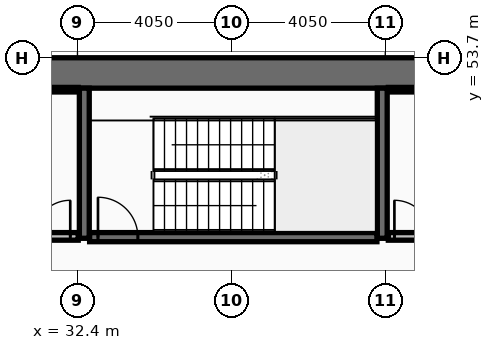
"""IFC4 building model, lengths in metres.
Left out: names, types, materials, properties, quantities, classifications, styles, units other than length and angle.
Written with IfcOpenShell. Run it as: python <this file> out.ifc"""

import sys

from ifc_helpers import new_model, si_unit, direction, frame, frame_2d, origin, place, context, subcontext, project, spatial, rectangle, extrude, element, fill, save


model = new_model("IFC4")
c1 = context("Model", 3, precision=1e-05, world=origin(), true_north=direction((0.0, 1.0)))
c2 = subcontext(c1, "Body", "Model", "MODEL_VIEW")
j1 = project(units=[si_unit("LENGTHUNIT", "METRE"), si_unit("PLANEANGLEUNIT", "RADIAN")], contexts=[c1])
p1 = place(None, origin())
s1 = spatial("IfcSite", under=j1, at=p1, CompositionType="ELEMENT")
p2 = place(p1, origin())
s2 = spatial("IfcBuilding", under=s1, at=p2, CompositionType="ELEMENT")
p3 = place(p2, frame((0.0, 0.0, 73.8)))
s3 = spatial("IfcBuildingStorey", under=s2, at=p3, CompositionType="ELEMENT", Elevation=73.8)
p4 = place(p3, frame((16.2, 53.3, 0.0), z_axis=(0.0, 0.0, 1.0), x_axis=(1.0, 0.0, 0.0)))
e1 = element("IfcWall", 1, at=p4, inside=s3, PredefinedType="SHEAR", context=c2, shape_type="SweptSolid", body=[
    extrude(rectangle(XDim=40.5, YDim=0.8, at=frame_2d((20.25, 0.0))), origin(), (0.0, 0.0, 1.0), 3.82),
])
for number, where, z_axis, x_axis in (
    (2, (32.58, 48.95, 0.0), (0.0, 0.0, 1.0), (0.0, 1.0, 0.0)),
    (3, (40.42, 48.95, 0.0), (0.0, 0.0, 1.0), (0.0, 1.0, 0.0)),
):
    element("IfcWall", number, at=place(p3, frame(where, z_axis=z_axis, x_axis=x_axis)), inside=s3, PredefinedType="SHEAR", context=c2, shape_type="SweptSolid", body=[
        extrude(rectangle(XDim=3.95, YDim=0.26, at=frame_2d((1.975, 0.0))), origin(), (0.0, 0.0, 1.0), 3.82),
    ])
p5 = place(p3, frame((32.72, 48.98, 0.0), z_axis=(0.0, 0.0, 1.0), x_axis=(1.0, 0.0, 0.0)))
e4 = element("IfcWall", 4, at=p5, inside=s3, PredefinedType="SHEAR", context=c2, shape_type="SweptSolid", body=[
    extrude(rectangle(XDim=7.56, YDim=0.24, at=frame_2d((3.78, 0.0))), origin(), (0.0, 0.0, 1.0), 3.82),
])
p6 = place(p5, frame((0.22, 0.0, 0.0)))
e5 = element("IfcOpeningElement", 5, at=p6, cuts=e4, PredefinedType="OPENING", context=c2, shape_type="SweptSolid", body=[
    extrude(rectangle(XDim=1.05, YDim=2.15, at=frame_2d((0.525, 1.075))), frame((0.0, 0.13, 0.0), z_axis=(0.0, -1.0, 0.0), x_axis=(1.0, 0.0, 0.0)), (0.0, 0.0, 1.0), 0.26),
])
p7 = place(p3, frame((24.7, 52.86, 0.0), z_axis=(0.0, 0.0, 1.0), x_axis=(1.0, 0.0, 0.0)))
e6 = element("IfcWall", 6, at=p7, inside=s3, PredefinedType="PARTITIONING", context=c2, shape_type="SweptSolid", body=[
    extrude(rectangle(XDim=7.72, YDim=0.12, at=frame_2d((3.86, 0.0))), origin(), (0.0, 0.0, 1.0), 3.82),
])
p8 = place(p3, frame((24.7, 49.0, 0.0), z_axis=(0.0, 0.0, 1.0), x_axis=(1.0, 0.0, 0.0)))
e7 = element("IfcWall", 7, at=p8, inside=s3, PredefinedType="PARTITIONING", context=c2, shape_type="SweptSolid", body=[
    extrude(rectangle(XDim=7.72, YDim=0.2, at=frame_2d((3.86, 0.0))), origin(), (0.0, 0.0, 1.0), 3.82),
])
p9 = place(p8, frame((6.56, 0.0, 0.0)))
e8 = element("IfcOpeningElement", 8, at=p9, cuts=e7, PredefinedType="OPENING", context=c2, shape_type="SweptSolid", body=[
    extrude(rectangle(XDim=0.95, YDim=2.1, at=frame_2d((0.475, 1.05))), frame((0.0, 0.11, 0.0), z_axis=(0.0, -1.0, 0.0), x_axis=(1.0, 0.0, 0.0)), (0.0, 0.0, 1.0), 0.22),
])
p10 = place(p3, frame((40.58, 52.86, 0.0), z_axis=(0.0, 0.0, 1.0), x_axis=(1.0, 0.0, 0.0)))
e9 = element("IfcWall", 9, at=p10, inside=s3, PredefinedType="PARTITIONING", context=c2, shape_type="SweptSolid", body=[
    extrude(rectangle(XDim=7.56, YDim=0.12, at=frame_2d((3.78, 0.0))), origin(), (0.0, 0.0, 1.0), 3.82),
])
p11 = place(p3, frame((40.58, 49.0, 0.0), z_axis=(0.0, 0.0, 1.0), x_axis=(1.0, 0.0, 0.0)))
e10 = element("IfcWall", 10, at=p11, inside=s3, PredefinedType="PARTITIONING", context=c2, shape_type="SweptSolid", body=[
    extrude(rectangle(XDim=7.56, YDim=0.2, at=frame_2d((3.78, 0.0))), origin(), (0.0, 0.0, 1.0), 3.82),
])
p12 = place(p11, frame((0.16, 0.0, 0.0)))
e11 = element("IfcOpeningElement", 11, at=p12, cuts=e10, PredefinedType="OPENING", context=c2, shape_type="SweptSolid", body=[
    extrude(rectangle(XDim=0.95, YDim=2.1, at=frame_2d((0.475, 1.05))), frame((0.0, 0.11, 0.0), z_axis=(0.0, -1.0, 0.0), x_axis=(1.0, 0.0, 0.0)), (0.0, 0.0, 1.0), 0.22),
])
p13 = place(p6, origin())
e12 = element("IfcDoor", 12, at=p13, inside=s3, OperationType="SINGLE_SWING_LEFT", PredefinedType="DOOR", context=c2, shape_type="SweptSolid", body=[
    extrude(rectangle(XDim=1.05, YDim=2.15, at=frame_2d((0.525, 1.075))), frame((0.0, 0.025, 0.0), z_axis=(0.0, -1.0, 0.0), x_axis=(1.0, 0.0, 0.0)), (0.0, 0.0, 1.0), 0.05),
])
fill(e5, e12)
p14 = place(p9, origin())
e13 = element("IfcDoor", 13, at=p14, inside=s3, OperationType="SINGLE_SWING_RIGHT", PredefinedType="DOOR", context=c2, shape_type="SweptSolid", body=[
    extrude(rectangle(XDim=0.95, YDim=2.1, at=frame_2d((0.475, 1.05))), frame((0.0, 0.025, 0.0), z_axis=(0.0, -1.0, 0.0), x_axis=(1.0, 0.0, 0.0)), (0.0, 0.0, 1.0), 0.05),
])
fill(e8, e13)
p15 = place(p12, origin())
e14 = element("IfcDoor", 14, at=p15, inside=s3, OperationType="SINGLE_SWING_LEFT", PredefinedType="DOOR", context=c2, shape_type="SweptSolid", body=[
    extrude(rectangle(XDim=0.95, YDim=2.1, at=frame_2d((0.475, 1.05))), frame((0.0, 0.025, 0.0), z_axis=(0.0, -1.0, 0.0), x_axis=(1.0, 0.0, 0.0)), (0.0, 0.0, 1.0), 0.05),
])
fill(e11, e14)
save(model, sys.argv[1])
